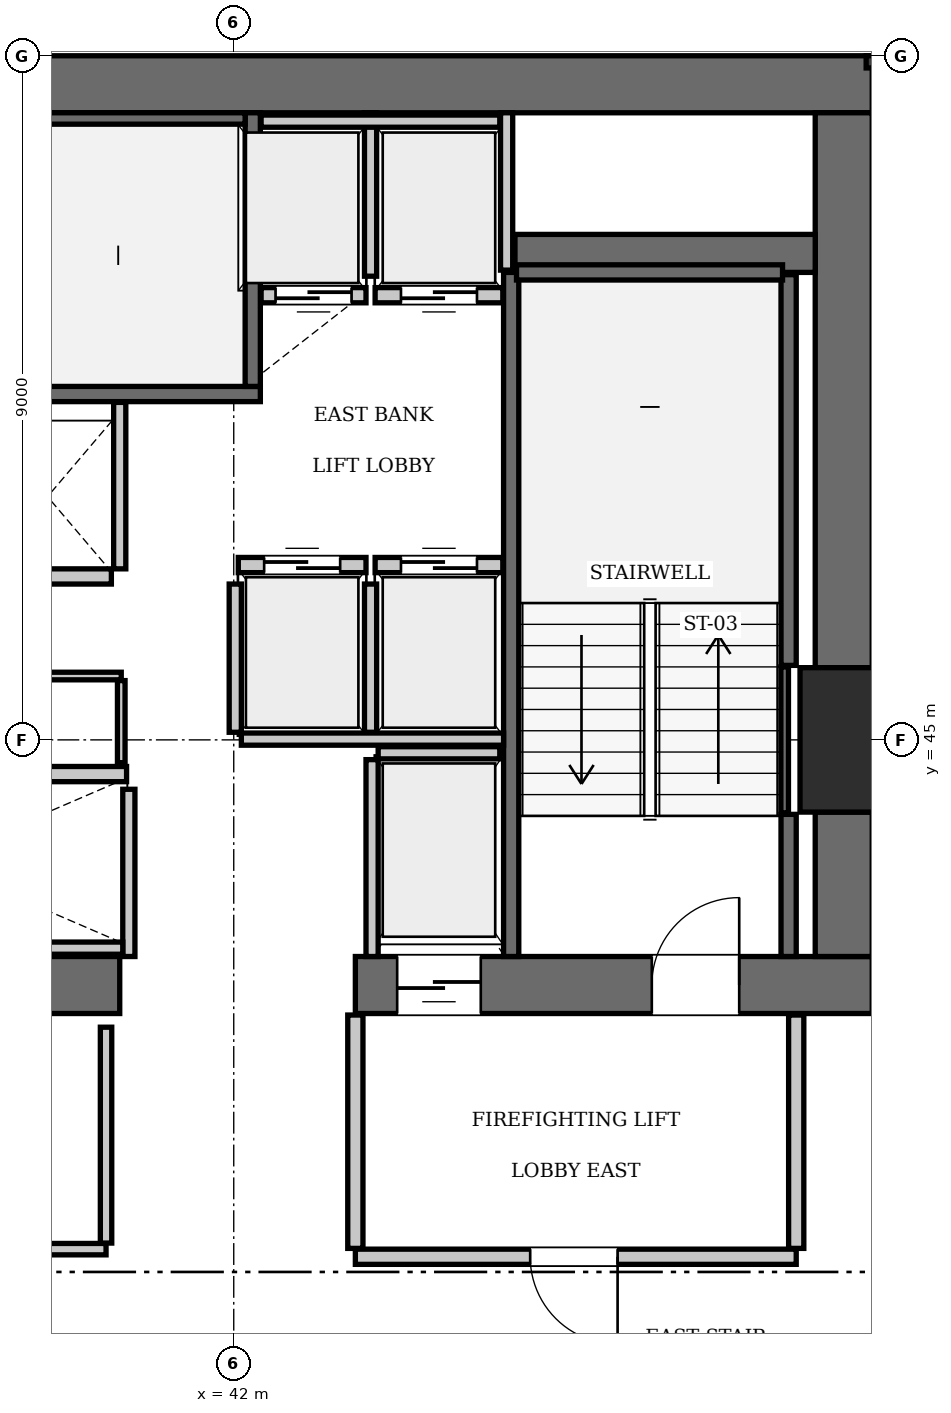
"""IFC4 building model, lengths in metres.
Left out: names, types, materials, properties, quantities, classifications, styles, units other than length and angle.
Written with IfcOpenShell. Run it as: python <this file> out.ifc"""

import sys

from ifc_helpers import new_model, si_unit, direction, frame, frame_2d, origin, origin_2d, place, context, subcontext, project, spatial, rectangle, extrude, element, fill, save


model = new_model("IFC4")
c1 = context("Model", 3, precision=1e-05, world=origin(), true_north=direction((0.0, 1.0)))
c2 = subcontext(c1, "Body", "Model", "MODEL_VIEW")
j1 = project(units=[si_unit("LENGTHUNIT", "METRE"), si_unit("PLANEANGLEUNIT", "RADIAN")], contexts=[c1])
p1 = place(None, origin())
s1 = spatial("IfcSite", under=j1, at=p1, CompositionType="ELEMENT")
p2 = place(p1, origin())
s2 = spatial("IfcBuilding", under=s1, at=p2, CompositionType="ELEMENT")
p3 = place(p2, frame((0.0, 0.0, 127.4)))
s3 = spatial("IfcBuildingStorey", under=s2, at=p3, CompositionType="ELEMENT", Elevation=127.4)
p4 = place(p3, frame((50.4, 45.0, 0.0), z_axis=(0.0, 0.0, 1.0), x_axis=(1.0, 0.0, 0.0)))
e1 = element("IfcColumn", 1, at=p4, inside=s3, PredefinedType="COLUMN", context=c2, shape_type="SweptSolid", body=[
    extrude(rectangle(XDim=1.9, YDim=1.9, at=origin_2d()), origin(), (0.0, 0.0, 1.0), 3.85),
])
p5 = place(p3, frame((25.2, 53.625, 0.0), z_axis=(0.0, 0.0, 1.0), x_axis=(1.0, 0.0, 0.0)))
e2 = element("IfcWall", 2, at=p5, inside=s3, PredefinedType="SHEAR", context=c2, shape_type="SweptSolid", body=[
    extrude(rectangle(XDim=25.2, YDim=0.75, at=frame_2d((12.6, 0.0))), origin(), (0.0, 0.0, 1.0), 3.85),
])
p6 = place(p3, frame((35.1, 41.775, 0.0), z_axis=(0.0, 0.0, 1.0), x_axis=(1.0, 0.0, 0.0)))
e3 = element("IfcWall", 3, at=p6, inside=s3, PredefinedType="SHEAR", context=c2, shape_type="SweptSolid", body=[
    extrude(rectangle(XDim=5.4, YDim=0.75, at=frame_2d((2.7, 0.0))), origin(), (0.0, 0.0, 1.0), 3.85),
])
p7 = place(p3, frame((43.6, 41.775, 0.0), z_axis=(0.0, 0.0, 1.0), x_axis=(1.0, 0.0, 0.0)))
e4 = element("IfcWall", 4, at=p7, inside=s3, PredefinedType="SHEAR", context=c2, shape_type="SweptSolid", body=[
    extrude(rectangle(XDim=6.8, YDim=0.75, at=frame_2d((3.4, 0.0))), origin(), (0.0, 0.0, 1.0), 3.85),
])
p8 = place(p7, frame((3.9, 0.0, 0.0)))
e5 = element("IfcOpeningElement", 5, at=p8, cuts=e4, PredefinedType="OPENING", context=c2, shape_type="SweptSolid", body=[
    extrude(rectangle(XDim=1.15, YDim=2.15, at=frame_2d((0.575, 1.075))), frame((0.0, 0.385, 0.0), z_axis=(0.0, -1.0, 0.0), x_axis=(1.0, 0.0, 0.0)), (0.0, 0.0, 1.0), 0.77),
])
p9 = place(p7, frame((0.55, 0.0, 0.0)))
e6 = element("IfcOpeningElement", 6, at=p9, cuts=e4, PredefinedType="OPENING", context=c2, shape_type="SweptSolid", body=[
    extrude(rectangle(XDim=1.1, YDim=2.2, at=frame_2d((0.55, 1.1))), frame((0.0, 0.385, 0.0), z_axis=(0.0, -1.0, 0.0), x_axis=(1.0, 0.0, 0.0)), (0.0, 0.0, 1.0), 0.77),
])
p10 = place(p3, frame((50.025, 42.15, 0.0), z_axis=(0.0, 0.0, 1.0), x_axis=(0.0, 1.0, 0.0)))
e7 = element("IfcWall", 7, at=p10, inside=s3, PredefinedType="SHEAR", context=c2, shape_type="SweptSolid", body=[
    extrude(rectangle(XDim=1.9, YDim=0.75, at=frame_2d((0.95, 0.0))), origin(), (0.0, 0.0, 1.0), 3.85),
])
p11 = place(p3, frame((50.025, 45.95, 0.0), z_axis=(0.0, 0.0, 1.0), x_axis=(0.0, 1.0, 0.0)))
e8 = element("IfcWall", 8, at=p11, inside=s3, PredefinedType="SHEAR", context=c2, shape_type="SweptSolid", body=[
    extrude(rectangle(XDim=7.3, YDim=0.75, at=frame_2d((3.65, 0.0))), origin(), (0.0, 0.0, 1.0), 3.85),
])
p12 = place(p3, frame((45.7, 51.4, 0.0), z_axis=(0.0, 0.0, 1.0), x_axis=(1.0, 0.0, 0.0)))
e9 = element("IfcWall", 9, at=p12, inside=s3, PredefinedType="SHEAR", context=c2, shape_type="SweptSolid", body=[
    extrude(rectangle(XDim=3.95, YDim=0.5, at=frame_2d((1.975, 0.0))), origin(), (0.0, 0.0, 1.0), 3.85),
])
p13 = place(p3, frame((33.25, 49.55, 0.0), z_axis=(0.0, 0.0, 1.0), x_axis=(1.0, 0.0, 0.0)))
e10 = element("IfcWall", 10, at=p13, inside=s3, PredefinedType="SOLIDWALL", context=c2, shape_type="SweptSolid", body=[
    extrude(rectangle(XDim=9.1, YDim=0.2, at=frame_2d((4.55, 0.0))), origin(), (0.0, 0.0, 1.0), 3.61),
])
p14 = place(p3, frame((42.25, 49.65, 0.0), z_axis=(0.0, 0.0, 1.0), x_axis=(0.0, 1.0, 0.0)))
e11 = element("IfcWall", 11, at=p14, inside=s3, PredefinedType="SOLIDWALL", context=c2, shape_type="SweptSolid", body=[
    extrude(rectangle(XDim=3.6, YDim=0.2, at=frame_2d((1.8, 0.0))), origin(), (0.0, 0.0, 1.0), 3.61),
])
p15 = place(p3, frame((33.45, 53.175, 0.0), z_axis=(0.0, 0.0, 1.0), x_axis=(1.0, 0.0, 0.0)))
e12 = element("IfcWall", 12, at=p15, inside=s3, PredefinedType="SOLIDWALL", context=c2, shape_type="SweptSolid", body=[
    extrude(rectangle(XDim=8.7, YDim=0.15, at=frame_2d((4.35, 0.0))), origin(), (0.0, 0.0, 1.0), 3.61),
])
p16 = place(p3, frame((45.65, 42.15, 0.0), z_axis=(0.0, 0.0, 1.0), x_axis=(0.0, 1.0, 0.0)))
e13 = element("IfcWall", 13, at=p16, inside=s3, PredefinedType="SOLIDWALL", context=c2, shape_type="SweptSolid", body=[
    extrude(rectangle(XDim=9.0, YDim=0.2, at=frame_2d((4.5, 0.0))), origin(), (0.0, 0.0, 1.0), 3.61),
])
p17 = place(p3, frame((49.3, 42.15, 0.0), z_axis=(0.0, 0.0, 1.0), x_axis=(0.0, 1.0, 0.0)))
e14 = element("IfcWall", 14, at=p17, inside=s3, PredefinedType="SOLIDWALL", context=c2, shape_type="SweptSolid", body=[
    extrude(rectangle(XDim=1.87, YDim=0.2, at=frame_2d((0.935, 0.0))), origin(), (0.0, 0.0, 1.0), 3.61),
])
p18 = place(p3, frame((49.3, 45.98, 0.0), z_axis=(0.0, 0.0, 1.0), x_axis=(0.0, 1.0, 0.0)))
e15 = element("IfcWall", 15, at=p18, inside=s3, PredefinedType="SOLIDWALL", context=c2, shape_type="SweptSolid", body=[
    extrude(rectangle(XDim=5.14, YDim=0.2, at=frame_2d((2.57, 0.0))), origin(), (0.0, 0.0, 1.0), 3.61),
])
p19 = place(p3, frame((45.72, 51.15, 0.0), z_axis=(0.0, 0.0, 1.0), x_axis=(1.0, 0.0, 0.0)))
e16 = element("IfcWall", 16, at=p19, inside=s3, PredefinedType="SOLIDWALL", context=c2, shape_type="SweptSolid", body=[
    extrude(rectangle(XDim=3.5, YDim=0.2, at=frame_2d((1.75, 0.0))), origin(), (0.0, 0.0, 1.0), 3.61),
])
p20 = place(p3, frame((49.248, 44.04, 0.0), z_axis=(0.0, 0.0, 1.0), x_axis=(0.0, 1.0, 0.0)))
e17 = element("IfcWall", 17, at=p20, inside=s3, PredefinedType="SOLIDWALL", context=c2, shape_type="SweptSolid", body=[
    extrude(rectangle(XDim=1.92, YDim=0.1, at=frame_2d((0.96, 0.0))), origin(), (0.0, 0.0, 1.0), 3.61),
])
p21 = place(p3, frame((42.06, 47.3, 0.0), z_axis=(0.0, 0.0, 1.0), x_axis=(1.0, 0.0, 0.0)))
e18 = element("IfcWall", 18, at=p21, inside=s3, PredefinedType="SOLIDWALL", context=c2, shape_type="SweptSolid", body=[
    extrude(rectangle(XDim=1.68, YDim=0.2, at=frame_2d((0.84, 0.0))), origin(), (0.0, 0.0, 1.0), 3.61),
])
p22 = place(p21, frame((0.34, 0.0, 0.0)))
e19 = element("IfcOpeningElement", 19, at=p22, cuts=e18, PredefinedType="OPENING", context=c2, shape_type="SweptSolid", body=[
    extrude(rectangle(XDim=1.0, YDim=2.15, at=frame_2d((0.5, 1.075))), frame((0.0, 0.11, 0.0), z_axis=(0.0, -1.0, 0.0), x_axis=(1.0, 0.0, 0.0)), (0.0, 0.0, 1.0), 0.22),
])
p23 = place(p3, frame((43.86, 47.3, 0.0), z_axis=(0.0, 0.0, 1.0), x_axis=(1.0, 0.0, 0.0)))
e20 = element("IfcWall", 20, at=p23, inside=s3, PredefinedType="SOLIDWALL", context=c2, shape_type="SweptSolid", body=[
    extrude(rectangle(XDim=1.68, YDim=0.2, at=frame_2d((0.84, 0.0))), origin(), (0.0, 0.0, 1.0), 3.61),
])
p24 = place(p23, frame((0.34, 0.0, 0.0)))
e21 = element("IfcOpeningElement", 21, at=p24, cuts=e20, PredefinedType="OPENING", context=c2, shape_type="SweptSolid", body=[
    extrude(rectangle(XDim=1.0, YDim=2.15, at=frame_2d((0.5, 1.075))), frame((0.0, 0.11, 0.0), z_axis=(0.0, -1.0, 0.0), x_axis=(1.0, 0.0, 0.0)), (0.0, 0.0, 1.0), 0.22),
])
p25 = place(p3, frame((42.36, 50.85, 0.0), z_axis=(0.0, 0.0, 1.0), x_axis=(1.0, 0.0, 0.0)))
e22 = element("IfcWall", 22, at=p25, inside=s3, PredefinedType="SOLIDWALL", context=c2, shape_type="SweptSolid", body=[
    extrude(rectangle(XDim=1.38, YDim=0.2, at=frame_2d((0.69, 0.0))), origin(), (0.0, 0.0, 1.0), 3.61),
])
p26 = place(p25, frame((0.19, 0.0, 0.0)))
e23 = element("IfcOpeningElement", 23, at=p26, cuts=e22, PredefinedType="OPENING", context=c2, shape_type="SweptSolid", body=[
    extrude(rectangle(XDim=1.0, YDim=2.15, at=frame_2d((0.5, 1.075))), frame((0.0, 0.11, 0.0), z_axis=(0.0, -1.0, 0.0), x_axis=(1.0, 0.0, 0.0)), (0.0, 0.0, 1.0), 0.22),
])
p27 = place(p3, frame((43.86, 50.85, 0.0), z_axis=(0.0, 0.0, 1.0), x_axis=(1.0, 0.0, 0.0)))
e24 = element("IfcWall", 24, at=p27, inside=s3, PredefinedType="SOLIDWALL", context=c2, shape_type="SweptSolid", body=[
    extrude(rectangle(XDim=1.68, YDim=0.2, at=frame_2d((0.84, 0.0))), origin(), (0.0, 0.0, 1.0), 3.61),
])
p28 = place(p27, frame((0.34, 0.0, 0.0)))
e25 = element("IfcOpeningElement", 25, at=p28, cuts=e24, PredefinedType="OPENING", context=c2, shape_type="SweptSolid", body=[
    extrude(rectangle(XDim=1.0, YDim=2.15, at=frame_2d((0.5, 1.075))), frame((0.0, 0.11, 0.0), z_axis=(0.0, -1.0, 0.0), x_axis=(1.0, 0.0, 0.0)), (0.0, 0.0, 1.0), 0.22),
])
p29 = place(p3, frame((38.91, 44.55, 0.0), z_axis=(0.0, 0.0, 1.0), x_axis=(1.0, 0.0, 0.0)))
e26 = element("IfcWall", 26, at=p29, inside=s3, PredefinedType="SOLIDWALL", context=c2, shape_type="SweptSolid", body=[
    extrude(rectangle(XDim=1.68, YDim=0.2, at=frame_2d((0.84, 0.0))), origin(), (0.0, 0.0, 1.0), 3.61),
])
p30 = place(p3, frame((38.71, 47.15, 0.0), z_axis=(0.0, 0.0, 1.0), x_axis=(1.0, 0.0, 0.0)))
e27 = element("IfcWall", 27, at=p30, inside=s3, PredefinedType="SOLIDWALL", context=c2, shape_type="SweptSolid", body=[
    extrude(rectangle(XDim=1.68, YDim=0.2, at=frame_2d((0.84, 0.0))), origin(), (0.0, 0.0, 1.0), 3.61),
])
p31 = place(p3, frame((43.9, 44.83, 0.0), z_axis=(0.0, 0.0, 1.0), x_axis=(1.0, 0.0, 0.0)))
e28 = element("IfcWall", 28, at=p31, inside=s3, PredefinedType="SOLIDWALL", context=c2, shape_type="SweptSolid", body=[
    extrude(rectangle(XDim=1.6, YDim=0.16, at=frame_2d((0.8, 0.0))), origin(), (0.0, 0.0, 1.0), 3.61),
])
p32 = place(p3, frame((43.82, 42.15, 0.0), z_axis=(0.0, 0.0, 1.0), x_axis=(0.0, 1.0, 0.0)))
e29 = element("IfcWall", 29, at=p32, inside=s3, PredefinedType="SOLIDWALL", context=c2, shape_type="SweptSolid", body=[
    extrude(rectangle(XDim=2.59, YDim=0.16, at=frame_2d((1.295, 0.0))), origin(), (0.0, 0.0, 1.0), 3.61),
])
for number, where, z_axis, x_axis in (
    (30, (42.02, 45.1, 0.0), (0.0, 0.0, 1.0), (0.0, 1.0, 0.0)),
    (31, (43.8, 45.1, 0.0), (0.0, 0.0, 1.0), (0.0, 1.0, 0.0)),
):
    element("IfcWall", number, at=place(p3, frame(where, z_axis=z_axis, x_axis=x_axis)), inside=s3, PredefinedType="SOLIDWALL", context=c2, shape_type="SweptSolid", body=[
        extrude(rectangle(XDim=1.95, YDim=0.16, at=frame_2d((0.975, 0.0))), origin(), (0.0, 0.0, 1.0), 3.61),
    ])
p33 = place(p3, frame((42.1, 45.01, 0.0), z_axis=(0.0, 0.0, 1.0), x_axis=(1.0, 0.0, 0.0)))
e32 = element("IfcWall", 32, at=p33, inside=s3, PredefinedType="SOLIDWALL", context=c2, shape_type="SweptSolid", body=[
    extrude(rectangle(XDim=3.45, YDim=0.16, at=frame_2d((1.725, 0.0))), origin(), (0.0, 0.0, 1.0), 3.61),
])
p34 = place(p3, frame((45.59, 51.18, 0.0), z_axis=(0.0, 0.0, 1.0), x_axis=(0.0, 1.0, 0.0)))
e33 = element("IfcWall", 33, at=p34, inside=s3, PredefinedType="SOLIDWALL", context=c2, shape_type="SweptSolid", body=[
    extrude(rectangle(XDim=2.07, YDim=0.16, at=frame_2d((1.035, 0.0))), origin(), (0.0, 0.0, 1.0), 3.61),
])
p35 = place(p3, frame((43.8, 51.1, 0.0), z_axis=(0.0, 0.0, 1.0), x_axis=(0.0, 1.0, 0.0)))
e34 = element("IfcWall", 34, at=p35, inside=s3, PredefinedType="SOLIDWALL", context=c2, shape_type="SweptSolid", body=[
    extrude(rectangle(XDim=2.15, YDim=0.16, at=frame_2d((1.075, 0.0))), origin(), (0.0, 0.0, 1.0), 3.61),
])
p36 = place(p3, frame((42.36, 53.14, 0.0), z_axis=(0.0, 0.0, 1.0), x_axis=(1.0, 0.0, 0.0)))
e35 = element("IfcWall", 35, at=p36, inside=s3, PredefinedType="SOLIDWALL", context=c2, shape_type="SweptSolid", body=[
    extrude(rectangle(XDim=3.14, YDim=0.16, at=frame_2d((1.57, 0.0))), origin(), (0.0, 0.0, 1.0), 3.61),
])
p37 = place(p3, frame((40.62, 42.15, 0.0), z_axis=(0.0, 0.0, 1.0), x_axis=(0.0, 1.0, 0.0)))
e36 = element("IfcWall", 36, at=p37, inside=s3, PredefinedType="SOLIDWALL", context=c2, shape_type="SweptSolid", body=[
    extrude(rectangle(XDim=2.2, YDim=0.16, at=frame_2d((1.1, 0.0))), origin(), (0.0, 0.0, 1.0), 3.61),
])
p38 = place(p3, frame((35.52, 42.26, 0.0), z_axis=(0.0, 0.0, 1.0), x_axis=(1.0, 0.0, 0.0)))
e37 = element("IfcWall", 37, at=p38, inside=s3, PredefinedType="SOLIDWALL", context=c2, shape_type="SweptSolid", body=[
    extrude(rectangle(XDim=5.02, YDim=0.16, at=frame_2d((2.51, 0.0))), origin(), (0.0, 0.0, 1.0), 3.61),
])
p39 = place(p3, frame((40.5, 47.25, 0.0), z_axis=(0.0, 0.0, 1.0), x_axis=(0.0, 1.0, 0.0)))
e38 = element("IfcWall", 38, at=p39, inside=s3, PredefinedType="SOLIDWALL", context=c2, shape_type="SweptSolid", body=[
    extrude(rectangle(XDim=2.19, YDim=0.16, at=frame_2d((1.095, 0.0))), origin(), (0.0, 0.0, 1.0), 3.61),
])
p40 = place(p3, frame((43.6, 38.2, 0.0), z_axis=(0.0, 0.0, 1.0), x_axis=(1.0, 0.0, 0.0)))
e39 = element("IfcWall", 39, at=p40, inside=s3, PredefinedType="PARTITIONING", context=c2, shape_type="SweptSolid", body=[
    extrude(rectangle(XDim=5.8, YDim=0.2, at=frame_2d((2.9, 0.0))), origin(), (0.0, 0.0, 1.0), 3.61),
])
p41 = place(p40, frame((2.3, 0.0, 0.0)))
e40 = element("IfcOpeningElement", 40, at=p41, cuts=e39, PredefinedType="OPENING", context=c2, shape_type="SweptSolid", body=[
    extrude(rectangle(XDim=1.15, YDim=2.15, at=frame_2d((0.575, 1.075))), frame((0.0, 0.11, 0.0), z_axis=(0.0, -1.0, 0.0), x_axis=(1.0, 0.0, 0.0)), (0.0, 0.0, 1.0), 0.22),
])
for number, where, z_axis, x_axis in (
    (41, (43.6, 38.31, 0.0), (0.0, 0.0, 1.0), (0.0, 1.0, 0.0)),
    (42, (49.4, 38.31, 0.0), (0.0, 0.0, 1.0), (0.0, 1.0, 0.0)),
):
    element("IfcWall", number, at=place(p3, frame(where, z_axis=z_axis, x_axis=x_axis)), inside=s3, PredefinedType="PARTITIONING", context=c2, shape_type="SweptSolid", body=[
        extrude(rectangle(XDim=3.07, YDim=0.2, at=frame_2d((1.535, 0.0))), origin(), (0.0, 0.0, 1.0), 3.61),
    ])
p42 = place(p3, frame((35.58, 45.84, 0.0), z_axis=(0.0, 0.0, 1.0), x_axis=(1.0, 0.0, 0.0)))
e43 = element("IfcWall", 43, at=p42, inside=s3, PredefinedType="PARTITIONING", context=c2, shape_type="SweptSolid", body=[
    extrude(rectangle(XDim=4.94, YDim=0.1, at=frame_2d((2.47, 0.0))), origin(), (0.0, 0.0, 1.0), 3.61),
])
p43 = place(p42, frame((1.8, 0.0, 0.0)))
e44 = element("IfcOpeningElement", 44, at=p43, cuts=e43, PredefinedType="OPENING", context=c2, shape_type="SweptSolid", body=[
    extrude(rectangle(XDim=0.8, YDim=2.05, at=frame_2d((0.4, 1.025))), frame((0.0, 0.06, 0.0), z_axis=(0.0, -1.0, 0.0), x_axis=(1.0, 0.0, 0.0)), (0.0, 0.0, 1.0), 0.12),
])
p44 = place(p3, frame((40.52, 44.7, 0.0), z_axis=(0.0, 0.0, 1.0), x_axis=(0.0, 1.0, 0.0)))
e45 = element("IfcWall", 45, at=p44, inside=s3, PredefinedType="PARTITIONING", context=c2, shape_type="SweptSolid", body=[
    extrude(rectangle(XDim=1.08, YDim=0.1, at=frame_2d((0.54, 0.0))), origin(), (0.0, 0.0, 1.0), 3.61),
])
p45 = place(p3, frame((34.4, 38.3, 0.0), z_axis=(0.0, 0.0, 1.0), x_axis=(1.0, 0.0, 0.0)))
e46 = element("IfcWall", 46, at=p45, inside=s3, PredefinedType="PARTITIONING", context=c2, shape_type="SweptSolid", body=[
    extrude(rectangle(XDim=5.92, YDim=0.15, at=frame_2d((2.96, 0.0))), origin(), (0.0, 0.0, 1.0), 3.61),
])
p46 = place(p45, frame((2.4, 0.0, 0.0)))
e47 = element("IfcOpeningElement", 47, at=p46, cuts=e46, PredefinedType="OPENING", context=c2, shape_type="SweptSolid", body=[
    extrude(rectangle(XDim=0.9, YDim=2.1, at=frame_2d((0.45, 1.05))), frame((0.0, 0.085, 0.0), z_axis=(0.0, -1.0, 0.0), x_axis=(1.0, 0.0, 0.0)), (0.0, 0.0, 1.0), 0.17),
])
p47 = place(p3, frame((40.32, 38.38, 0.0), z_axis=(0.0, 0.0, 1.0), x_axis=(0.0, 1.0, 0.0)))
e48 = element("IfcWall", 48, at=p47, inside=s3, PredefinedType="PARTITIONING", context=c2, shape_type="SweptSolid", body=[
    extrude(rectangle(XDim=2.84, YDim=0.15, at=frame_2d((1.42, 0.0))), origin(), (0.0, 0.0, 1.0), 3.61),
])
p48 = place(p8, origin())
e49 = element("IfcDoor", 49, at=p48, inside=s3, OperationType="SINGLE_SWING_RIGHT", PredefinedType="DOOR", context=c2, shape_type="SweptSolid", body=[
    extrude(rectangle(XDim=1.15, YDim=2.15, at=frame_2d((0.575, 1.075))), frame((0.0, 0.025, 0.0), z_axis=(0.0, -1.0, 0.0), x_axis=(1.0, 0.0, 0.0)), (0.0, 0.0, 1.0), 0.05),
])
fill(e5, e49)
p49 = place(p22, origin())
e50 = element("IfcDoor", 50, at=p49, inside=s3, OperationType="SLIDING_TO_LEFT", PredefinedType="DOOR", context=c2, shape_type="SweptSolid", body=[
    extrude(rectangle(XDim=1.0, YDim=2.15, at=frame_2d((0.5, 1.075))), frame((0.0, 0.025, 0.0), z_axis=(0.0, -1.0, 0.0), x_axis=(1.0, 0.0, 0.0)), (0.0, 0.0, 1.0), 0.05),
])
fill(e19, e50)
p50 = place(p24, origin())
e51 = element("IfcDoor", 51, at=p50, inside=s3, OperationType="SLIDING_TO_LEFT", PredefinedType="DOOR", context=c2, shape_type="SweptSolid", body=[
    extrude(rectangle(XDim=1.0, YDim=2.15, at=frame_2d((0.5, 1.075))), frame((0.0, 0.025, 0.0), z_axis=(0.0, -1.0, 0.0), x_axis=(1.0, 0.0, 0.0)), (0.0, 0.0, 1.0), 0.05),
])
fill(e21, e51)
p51 = place(p26, frame((1.0, 0.0, 0.0), z_axis=(0.0, 0.0, 1.0), x_axis=(-1.0, 0.0, 0.0)))
e52 = element("IfcDoor", 52, at=p51, inside=s3, OperationType="SLIDING_TO_LEFT", PredefinedType="DOOR", context=c2, shape_type="SweptSolid", body=[
    extrude(rectangle(XDim=1.0, YDim=2.15, at=frame_2d((0.5, 1.075))), frame((0.0, 0.025, 0.0), z_axis=(0.0, -1.0, 0.0), x_axis=(1.0, 0.0, 0.0)), (0.0, 0.0, 1.0), 0.05),
])
fill(e23, e52)
p52 = place(p28, frame((1.0, 0.0, 0.0), z_axis=(0.0, 0.0, 1.0), x_axis=(-1.0, 0.0, 0.0)))
e53 = element("IfcDoor", 53, at=p52, inside=s3, OperationType="SLIDING_TO_LEFT", PredefinedType="DOOR", context=c2, shape_type="SweptSolid", body=[
    extrude(rectangle(XDim=1.0, YDim=2.15, at=frame_2d((0.5, 1.075))), frame((0.0, 0.025, 0.0), z_axis=(0.0, -1.0, 0.0), x_axis=(1.0, 0.0, 0.0)), (0.0, 0.0, 1.0), 0.05),
])
fill(e25, e53)
p53 = place(p9, frame((1.1, 0.0, 0.0), z_axis=(0.0, 0.0, 1.0), x_axis=(-1.0, 0.0, 0.0)))
e54 = element("IfcDoor", 54, at=p53, inside=s3, OperationType="SLIDING_TO_LEFT", PredefinedType="DOOR", context=c2, shape_type="SweptSolid", body=[
    extrude(rectangle(XDim=1.1, YDim=2.2, at=frame_2d((0.55, 1.1))), frame((0.0, 0.025, 0.0), z_axis=(0.0, -1.0, 0.0), x_axis=(1.0, 0.0, 0.0)), (0.0, 0.0, 1.0), 0.05),
])
fill(e6, e54)
p54 = place(p41, frame((1.15, 0.0, 0.0), z_axis=(0.0, 0.0, 1.0), x_axis=(-1.0, 0.0, 0.0)))
e55 = element("IfcDoor", 55, at=p54, inside=s3, OperationType="SINGLE_SWING_LEFT", PredefinedType="DOOR", context=c2, shape_type="SweptSolid", body=[
    extrude(rectangle(XDim=1.15, YDim=2.15, at=frame_2d((0.575, 1.075))), frame((0.0, 0.025, 0.0), z_axis=(0.0, -1.0, 0.0), x_axis=(1.0, 0.0, 0.0)), (0.0, 0.0, 1.0), 0.05),
])
fill(e40, e55)
save(model, sys.argv[1])
